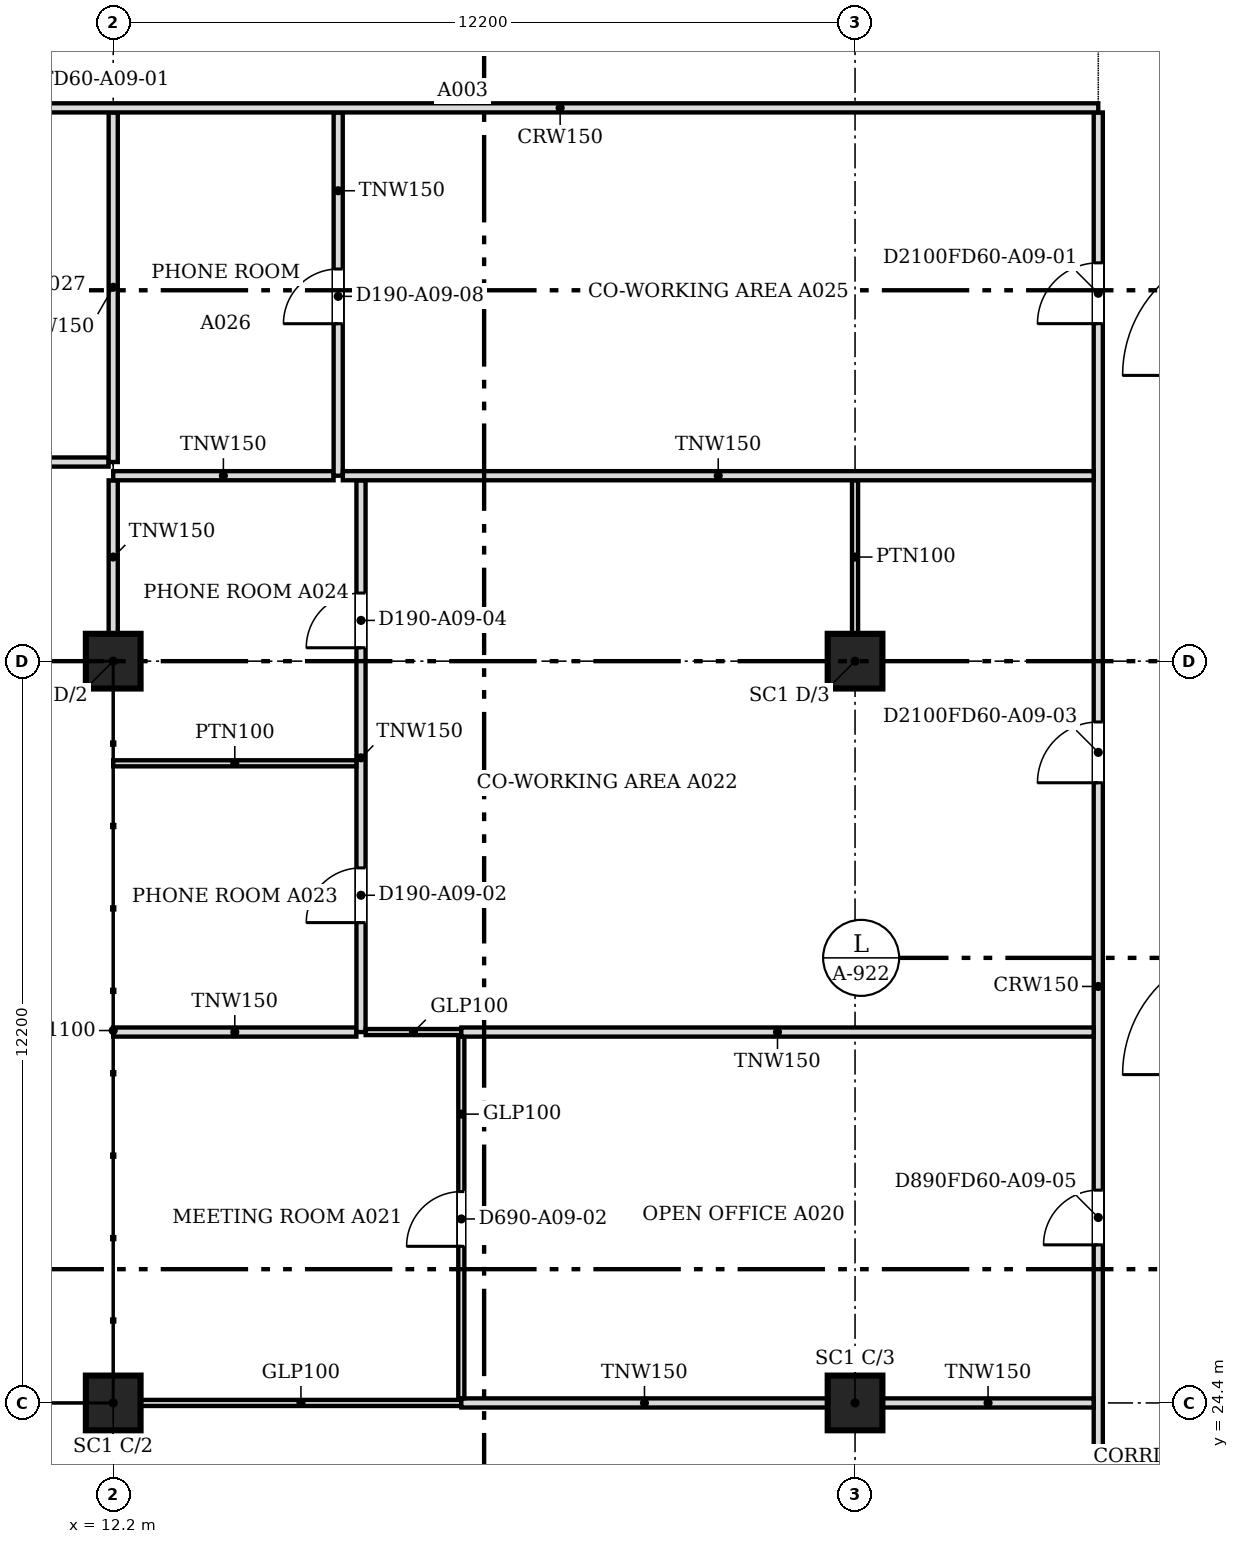
"""IFC4 building model, lengths in metres.
Left out: names, types, materials, properties, quantities, classifications, styles, units other than length and angle.
Written with IfcOpenShell. Run it as: python <this file> out.ifc"""

import sys

from ifc_helpers import new_model, si_unit, direction, frame, frame_2d, origin, origin_2d, place, context, subcontext, project, spatial, rectangle, extrude, source, transform, mapped, element, fill, save


model = new_model("IFC4")
c1 = context("Model", 3, precision=1e-05, world=origin(), true_north=direction((0.0, 1.0)))
c2 = subcontext(c1, "Body", "Model", "MODEL_VIEW")
j1 = project(units=[si_unit("LENGTHUNIT", "METRE"), si_unit("PLANEANGLEUNIT", "RADIAN")], contexts=[c1])
p1 = place(None, origin())
s1 = spatial("IfcSite", under=j1, at=p1, CompositionType="ELEMENT")
p2 = place(p1, origin())
s2 = spatial("IfcBuilding", under=s1, at=p2, CompositionType="ELEMENT")
p3 = place(p2, frame((0.0, 0.0, 99.0)))
s3 = spatial("IfcBuildingStorey", under=s2, at=p3, CompositionType="ELEMENT", Elevation=99.0)
for number, where, z_axis, x_axis in (
    (1, (12.2, 24.4, 0.0), (0.0, 0.0, 1.0), (1.0, 0.0, 0.0)),
    (2, (12.2, 36.6, 0.0), (0.0, 0.0, 1.0), (1.0, 0.0, 0.0)),
    (3, (24.4, 24.4, 0.0), (0.0, 0.0, 1.0), (1.0, 0.0, 0.0)),
    (4, (24.4, 36.6, 0.0), (0.0, 0.0, 1.0), (1.0, 0.0, 0.0)),
):
    element("IfcColumn", number, at=place(p3, frame(where, z_axis=z_axis, x_axis=x_axis)), inside=s3, PredefinedType="COLUMN", context=c2, shape_type="SweptSolid", body=[
        extrude(rectangle(XDim=0.9, YDim=0.9, at=origin_2d()), origin(), (0.0, 0.0, 1.0), 3.6),
    ])
p4 = place(p3, frame((28.4, 18.8, 0.0), z_axis=(0.0, 0.0, 1.0), x_axis=(0.0, 1.0, 0.0)))
e5 = element("IfcWall", 5, at=p4, inside=s3, PredefinedType="PARTITIONING", context=c2, shape_type="SweptSolid", body=[
    extrude(rectangle(XDim=26.824, YDim=0.15, at=frame_2d((13.412, 0.0))), origin(), (0.0, 0.0, 1.0), 3.067),
])
m1 = source(origin(), c2, "Body", "SweptSolid", [
    extrude(rectangle(XDim=0.9, YDim=2.1, at=frame_2d((0.45, 1.05))), frame((0.0, 0.085, 0.0), z_axis=(0.0, -1.0, 0.0), x_axis=(1.0, 0.0, 0.0)), (0.0, 0.0, 1.0), 0.17),
])
p5 = place(p4, frame((1.3, 0.0, 0.0)))
e6 = element("IfcOpeningElement", 6, at=p5, cuts=e5, PredefinedType="OPENING", context=c2, shape_type="MappedRepresentation", body=[
    mapped(m1, transform((0.0, 0.0, 0.0), scale=1.0)),
])
m2 = source(origin(), c2, "Body", "SweptSolid", [
    extrude(rectangle(XDim=1.0, YDim=2.1, at=frame_2d((0.5, 1.05))), frame((0.0, 0.085, 0.0), z_axis=(0.0, -1.0, 0.0), x_axis=(1.0, 0.0, 0.0)), (0.0, 0.0, 1.0), 0.17),
])
p6 = place(p4, frame((23.351, 0.0, 0.0)))
e7 = element("IfcOpeningElement", 7, at=p6, cuts=e5, PredefinedType="OPENING", context=c2, shape_type="MappedRepresentation", body=[
    mapped(m2, transform((0.0, 0.0, 0.0), scale=1.0)),
])
p7 = place(p4, frame((8.2, 0.0, 0.0)))
e8 = element("IfcOpeningElement", 8, at=p7, cuts=e5, PredefinedType="OPENING", context=c2, shape_type="MappedRepresentation", body=[
    mapped(m1, transform((0.0, 0.0, 0.0), scale=1.0)),
])
p8 = place(p4, frame((15.8, 0.0, 0.0)))
e9 = element("IfcOpeningElement", 9, at=p8, cuts=e5, PredefinedType="OPENING", context=c2, shape_type="MappedRepresentation", body=[
    mapped(m2, transform((0.0, 0.0, 0.0), scale=1.0)),
])
p9 = place(p3, frame((12.651, 24.4, 0.0), z_axis=(0.0, 0.0, 1.0), x_axis=(1.0, 0.0, 0.0)))
e10 = element("IfcWall", 10, at=p9, inside=s3, PredefinedType="PARTITIONING", context=c2, shape_type="SweptSolid", body=[
    extrude(rectangle(XDim=5.273, YDim=0.1, at=frame_2d((2.637, 0.0))), origin(), (0.0, 0.0, 1.0), 3.067),
])
p10 = place(p3, frame((17.925, 24.4, 0.0), z_axis=(0.0, 0.0, 1.0), x_axis=(1.0, 0.0, 0.0)))
e11 = element("IfcWall", 11, at=p10, inside=s3, PredefinedType="PARTITIONING", context=c2, shape_type="SweptSolid", body=[
    extrude(rectangle(XDim=6.024, YDim=0.15, at=frame_2d((3.012, 0.0))), origin(), (0.0, 0.0, 1.0), 3.067),
])
p11 = place(p3, frame((24.851, 24.4, 0.0), z_axis=(0.0, 0.0, 1.0), x_axis=(1.0, 0.0, 0.0)))
e12 = element("IfcWall", 12, at=p11, inside=s3, PredefinedType="PARTITIONING", context=c2, shape_type="SweptSolid", body=[
    extrude(rectangle(XDim=3.473, YDim=0.15, at=frame_2d((1.736, 0.0))), origin(), (0.0, 0.0, 1.0), 3.067),
])
p12 = place(p3, frame((17.925, 24.476, 0.0), z_axis=(0.0, 0.0, 1.0), x_axis=(0.0, 1.0, 0.0)))
e13 = element("IfcWall", 13, at=p12, inside=s3, PredefinedType="PARTITIONING", context=c2, shape_type="SweptSolid", body=[
    extrude(rectangle(XDim=5.948, YDim=0.1, at=frame_2d((2.974, 0.0))), origin(), (0.0, 0.0, 1.0), 3.067),
])
m3 = source(origin(), c2, "Body", "SweptSolid", [
    extrude(rectangle(XDim=0.9, YDim=2.1, at=frame_2d((0.45, 1.05))), frame((0.0, 0.06, 0.0), z_axis=(0.0, -1.0, 0.0), x_axis=(1.0, 0.0, 0.0)), (0.0, 0.0, 1.0), 0.12),
])
p13 = place(p12, frame((2.5, 0.0, 0.0)))
e14 = element("IfcOpeningElement", 14, at=p13, cuts=e13, PredefinedType="OPENING", context=c2, shape_type="MappedRepresentation", body=[
    mapped(m3, transform((0.0, 0.0, 0.0), scale=1.0)),
])
p14 = place(p3, frame((12.2, 30.5, 0.0), z_axis=(0.0, 0.0, 1.0), x_axis=(1.0, 0.0, 0.0)))
e15 = element("IfcWall", 15, at=p14, inside=s3, PredefinedType="PARTITIONING", context=c2, shape_type="SweptSolid", body=[
    extrude(rectangle(XDim=3.999, YDim=0.15, at=frame_2d((2.0, 0.0))), origin(), (0.0, 0.0, 1.0), 3.067),
])
p15 = place(p3, frame((16.275, 30.5, 0.0), z_axis=(0.0, 0.0, 1.0), x_axis=(0.0, 1.0, 0.0)))
e16 = element("IfcWall", 16, at=p15, inside=s3, PredefinedType="PARTITIONING", context=c2, shape_type="SweptSolid", body=[
    extrude(rectangle(XDim=9.074, YDim=0.15, at=frame_2d((4.537, 0.0))), origin(), (0.0, 0.0, 1.0), 3.067),
])
p16 = place(p15, frame((1.8, 0.0, 0.0)))
e17 = element("IfcOpeningElement", 17, at=p16, cuts=e16, PredefinedType="OPENING", context=c2, shape_type="MappedRepresentation", body=[
    mapped(m1, transform((0.0, 0.0, 0.0), scale=1.0)),
])
p17 = place(p15, frame((6.32, 0.0, 0.0)))
e18 = element("IfcOpeningElement", 18, at=p17, cuts=e16, PredefinedType="OPENING", context=c2, shape_type="MappedRepresentation", body=[
    mapped(m1, transform((0.0, 0.0, 0.0), scale=1.0)),
])
p18 = place(p3, frame((16.351, 30.5, 0.0), z_axis=(0.0, 0.0, 1.0), x_axis=(1.0, 0.0, 0.0)))
e19 = element("IfcWall", 19, at=p18, inside=s3, PredefinedType="PARTITIONING", context=c2, shape_type="SweptSolid", body=[
    extrude(rectangle(XDim=1.573, YDim=0.1, at=frame_2d((0.787, 0.0))), origin(), (0.0, 0.0, 1.0), 3.067),
])
p19 = place(p3, frame((17.925, 30.5, 0.0), z_axis=(0.0, 0.0, 1.0), x_axis=(1.0, 0.0, 0.0)))
e20 = element("IfcWall", 20, at=p19, inside=s3, PredefinedType="PARTITIONING", context=c2, shape_type="SweptSolid", body=[
    extrude(rectangle(XDim=10.399, YDim=0.15, at=frame_2d((5.199, 0.0))), origin(), (0.0, 0.0, 1.0), 3.067),
])
p20 = place(p3, frame((12.2, 34.92, 0.0), z_axis=(0.0, 0.0, 1.0), x_axis=(1.0, 0.0, 0.0)))
e21 = element("IfcWall", 21, at=p20, inside=s3, PredefinedType="PARTITIONING", context=c2, shape_type="SweptSolid", body=[
    extrude(rectangle(XDim=3.999, YDim=0.1, at=frame_2d((2.0, 0.0))), origin(), (0.0, 0.0, 1.0), 3.067),
])
p21 = place(p3, frame((12.2, 37.051, 0.0), z_axis=(0.0, 0.0, 1.0), x_axis=(0.0, 1.0, 0.0)))
e22 = element("IfcWall", 22, at=p21, inside=s3, PredefinedType="PARTITIONING", context=c2, shape_type="SweptSolid", body=[
    extrude(rectangle(XDim=2.523, YDim=0.15, at=frame_2d((1.261, 0.0))), origin(), (0.0, 0.0, 1.0), 3.067),
])
p22 = place(p3, frame((24.4, 37.05, 0.0), z_axis=(0.0, 0.0, 1.0), x_axis=(0.0, 1.0, 0.0)))
e23 = element("IfcWall", 23, at=p22, inside=s3, PredefinedType="PARTITIONING", context=c2, shape_type="SweptSolid", body=[
    extrude(rectangle(XDim=2.525, YDim=0.1, at=frame_2d((1.262, 0.0))), origin(), (0.0, 0.0, 1.0), 3.067),
])
p23 = place(p3, frame((12.2, 39.65, 0.0), z_axis=(0.0, 0.0, 1.0), x_axis=(1.0, 0.0, 0.0)))
e24 = element("IfcWall", 24, at=p23, inside=s3, PredefinedType="PARTITIONING", context=c2, shape_type="SweptSolid", body=[
    extrude(rectangle(XDim=3.624, YDim=0.15, at=frame_2d((1.812, 0.0))), origin(), (0.0, 0.0, 1.0), 3.067),
])
p24 = place(p3, frame((15.9, 39.65, 0.0), z_axis=(0.0, 0.0, 1.0), x_axis=(0.0, 1.0, 0.0)))
e25 = element("IfcWall", 25, at=p24, inside=s3, PredefinedType="PARTITIONING", context=c2, shape_type="SweptSolid", body=[
    extrude(rectangle(XDim=5.974, YDim=0.15, at=frame_2d((2.987, 0.0))), origin(), (0.0, 0.0, 1.0), 3.067),
])
p25 = place(p24, frame((2.5, 0.0, 0.0)))
e26 = element("IfcOpeningElement", 26, at=p25, cuts=e25, PredefinedType="OPENING", context=c2, shape_type="MappedRepresentation", body=[
    mapped(m1, transform((0.0, 0.0, 0.0), scale=1.0)),
])
p26 = place(p3, frame((15.976, 39.65, 0.0), z_axis=(0.0, 0.0, 1.0), x_axis=(1.0, 0.0, 0.0)))
e27 = element("IfcWall", 27, at=p26, inside=s3, PredefinedType="PARTITIONING", context=c2, shape_type="SweptSolid", body=[
    extrude(rectangle(XDim=12.348, YDim=0.15, at=frame_2d((6.174, 0.0))), origin(), (0.0, 0.0, 1.0), 3.067),
])
p27 = place(p3, frame((12.124, 39.875, 0.0), z_axis=(0.0, 0.0, 1.0), x_axis=(-1.0, 0.0, 0.0)))
e28 = element("IfcWall", 28, at=p27, inside=s3, PredefinedType="PARTITIONING", context=c2, shape_type="SweptSolid", body=[
    extrude(rectangle(XDim=4.624, YDim=0.15, at=frame_2d((2.312, 0.0))), origin(), (0.0, 0.0, 1.0), 3.067),
])
p28 = place(p27, frame((1.824, 0.0, 0.0)))
e29 = element("IfcOpeningElement", 29, at=p28, cuts=e28, PredefinedType="OPENING", context=c2, shape_type="MappedRepresentation", body=[
    mapped(m1, transform((0.0, 0.0, 0.0), scale=1.0)),
])
p29 = place(p3, frame((12.2, 39.875, 0.0), z_axis=(0.0, 0.0, 1.0), x_axis=(0.0, 1.0, 0.0)))
e30 = element("IfcWall", 30, at=p29, inside=s3, PredefinedType="PARTITIONING", context=c2, shape_type="SweptSolid", body=[
    extrude(rectangle(XDim=5.749, YDim=0.15, at=frame_2d((2.875, 0.0))), origin(), (0.0, 0.0, 1.0), 3.067),
])
p30 = place(p3, frame((28.4, 45.7, 0.0), z_axis=(0.0, 0.0, 1.0), x_axis=(-1.0, 0.0, 0.0)))
e31 = element("IfcWall", 31, at=p30, inside=s3, PredefinedType="PARTITIONING", context=c2, shape_type="SweptSolid", body=[
    extrude(rectangle(XDim=20.9, YDim=0.15, at=frame_2d((10.45, 0.0))), origin(), (0.0, 0.0, 1.0), 3.067),
])
m4 = source(origin(), c2, "Body", "SweptSolid", [
    extrude(rectangle(XDim=1.8, YDim=2.1, at=frame_2d((0.9, 1.05))), frame((0.0, 0.085, 0.0), z_axis=(0.0, -1.0, 0.0), x_axis=(1.0, 0.0, 0.0)), (0.0, 0.0, 1.0), 0.17),
])
p31 = place(p30, frame((17.7, 0.0, 0.0)))
e32 = element("IfcOpeningElement", 32, at=p31, cuts=e31, PredefinedType="OPENING", context=c2, shape_type="MappedRepresentation", body=[
    mapped(m4, transform((0.0, 0.0, 0.0), scale=1.0)),
])
m5 = source(origin(), c2, "Body", "SweptSolid", [
    extrude(rectangle(XDim=0.9, YDim=2.1, at=frame_2d((0.45, 1.05))), frame((0.0, 0.025, 0.0), z_axis=(0.0, -1.0, 0.0), x_axis=(1.0, 0.0, 0.0)), (0.0, 0.0, 1.0), 0.05),
])
p32 = place(p16, origin())
e33 = element("IfcDoor", 33, at=p32, inside=s3, OperationType="SINGLE_SWING_LEFT", PredefinedType="DOOR", context=c2, shape_type="MappedRepresentation", body=[
    mapped(m5, transform((0.0, 0.0, 0.0), scale=1.0)),
])
fill(e17, e33)
p33 = place(p17, origin())
e34 = element("IfcDoor", 34, at=p33, inside=s3, OperationType="SINGLE_SWING_LEFT", PredefinedType="DOOR", context=c2, shape_type="MappedRepresentation", body=[
    mapped(m5, transform((0.0, 0.0, 0.0), scale=1.0)),
])
fill(e18, e34)
p34 = place(p13, origin())
e35 = element("IfcDoor", 35, at=p34, inside=s3, OperationType="SINGLE_SWING_LEFT", PredefinedType="DOOR", context=c2, shape_type="MappedRepresentation", body=[
    mapped(m5, transform((0.0, 0.0, 0.0), scale=1.0)),
])
fill(e14, e35)
m6 = source(origin(), c2, "Body", "SweptSolid", [
    extrude(rectangle(XDim=1.0, YDim=2.1, at=frame_2d((0.5, 1.05))), frame((0.0, 0.025, 0.0), z_axis=(0.0, -1.0, 0.0), x_axis=(1.0, 0.0, 0.0)), (0.0, 0.0, 1.0), 0.05),
])
p35 = place(p6, origin())
e36 = element("IfcDoor", 36, at=p35, inside=s3, OperationType="SINGLE_SWING_LEFT", PredefinedType="DOOR", context=c2, shape_type="MappedRepresentation", body=[
    mapped(m6, transform((0.0, 0.0, 0.0), scale=1.0)),
])
fill(e7, e36)
p36 = place(p25, origin())
e37 = element("IfcDoor", 37, at=p36, inside=s3, OperationType="SINGLE_SWING_LEFT", PredefinedType="DOOR", context=c2, shape_type="MappedRepresentation", body=[
    mapped(m5, transform((0.0, 0.0, 0.0), scale=1.0)),
])
fill(e26, e37)
p37 = place(p7, origin())
e38 = element("IfcDoor", 38, at=p37, inside=s3, OperationType="SINGLE_SWING_LEFT", PredefinedType="DOOR", context=c2, shape_type="MappedRepresentation", body=[
    mapped(m5, transform((0.0, 0.0, 0.0), scale=1.0)),
])
fill(e8, e38)
p38 = place(p8, origin())
e39 = element("IfcDoor", 39, at=p38, inside=s3, OperationType="SINGLE_SWING_LEFT", PredefinedType="DOOR", context=c2, shape_type="MappedRepresentation", body=[
    mapped(m6, transform((0.0, 0.0, 0.0), scale=1.0)),
])
fill(e9, e39)
save(model, sys.argv[1])
